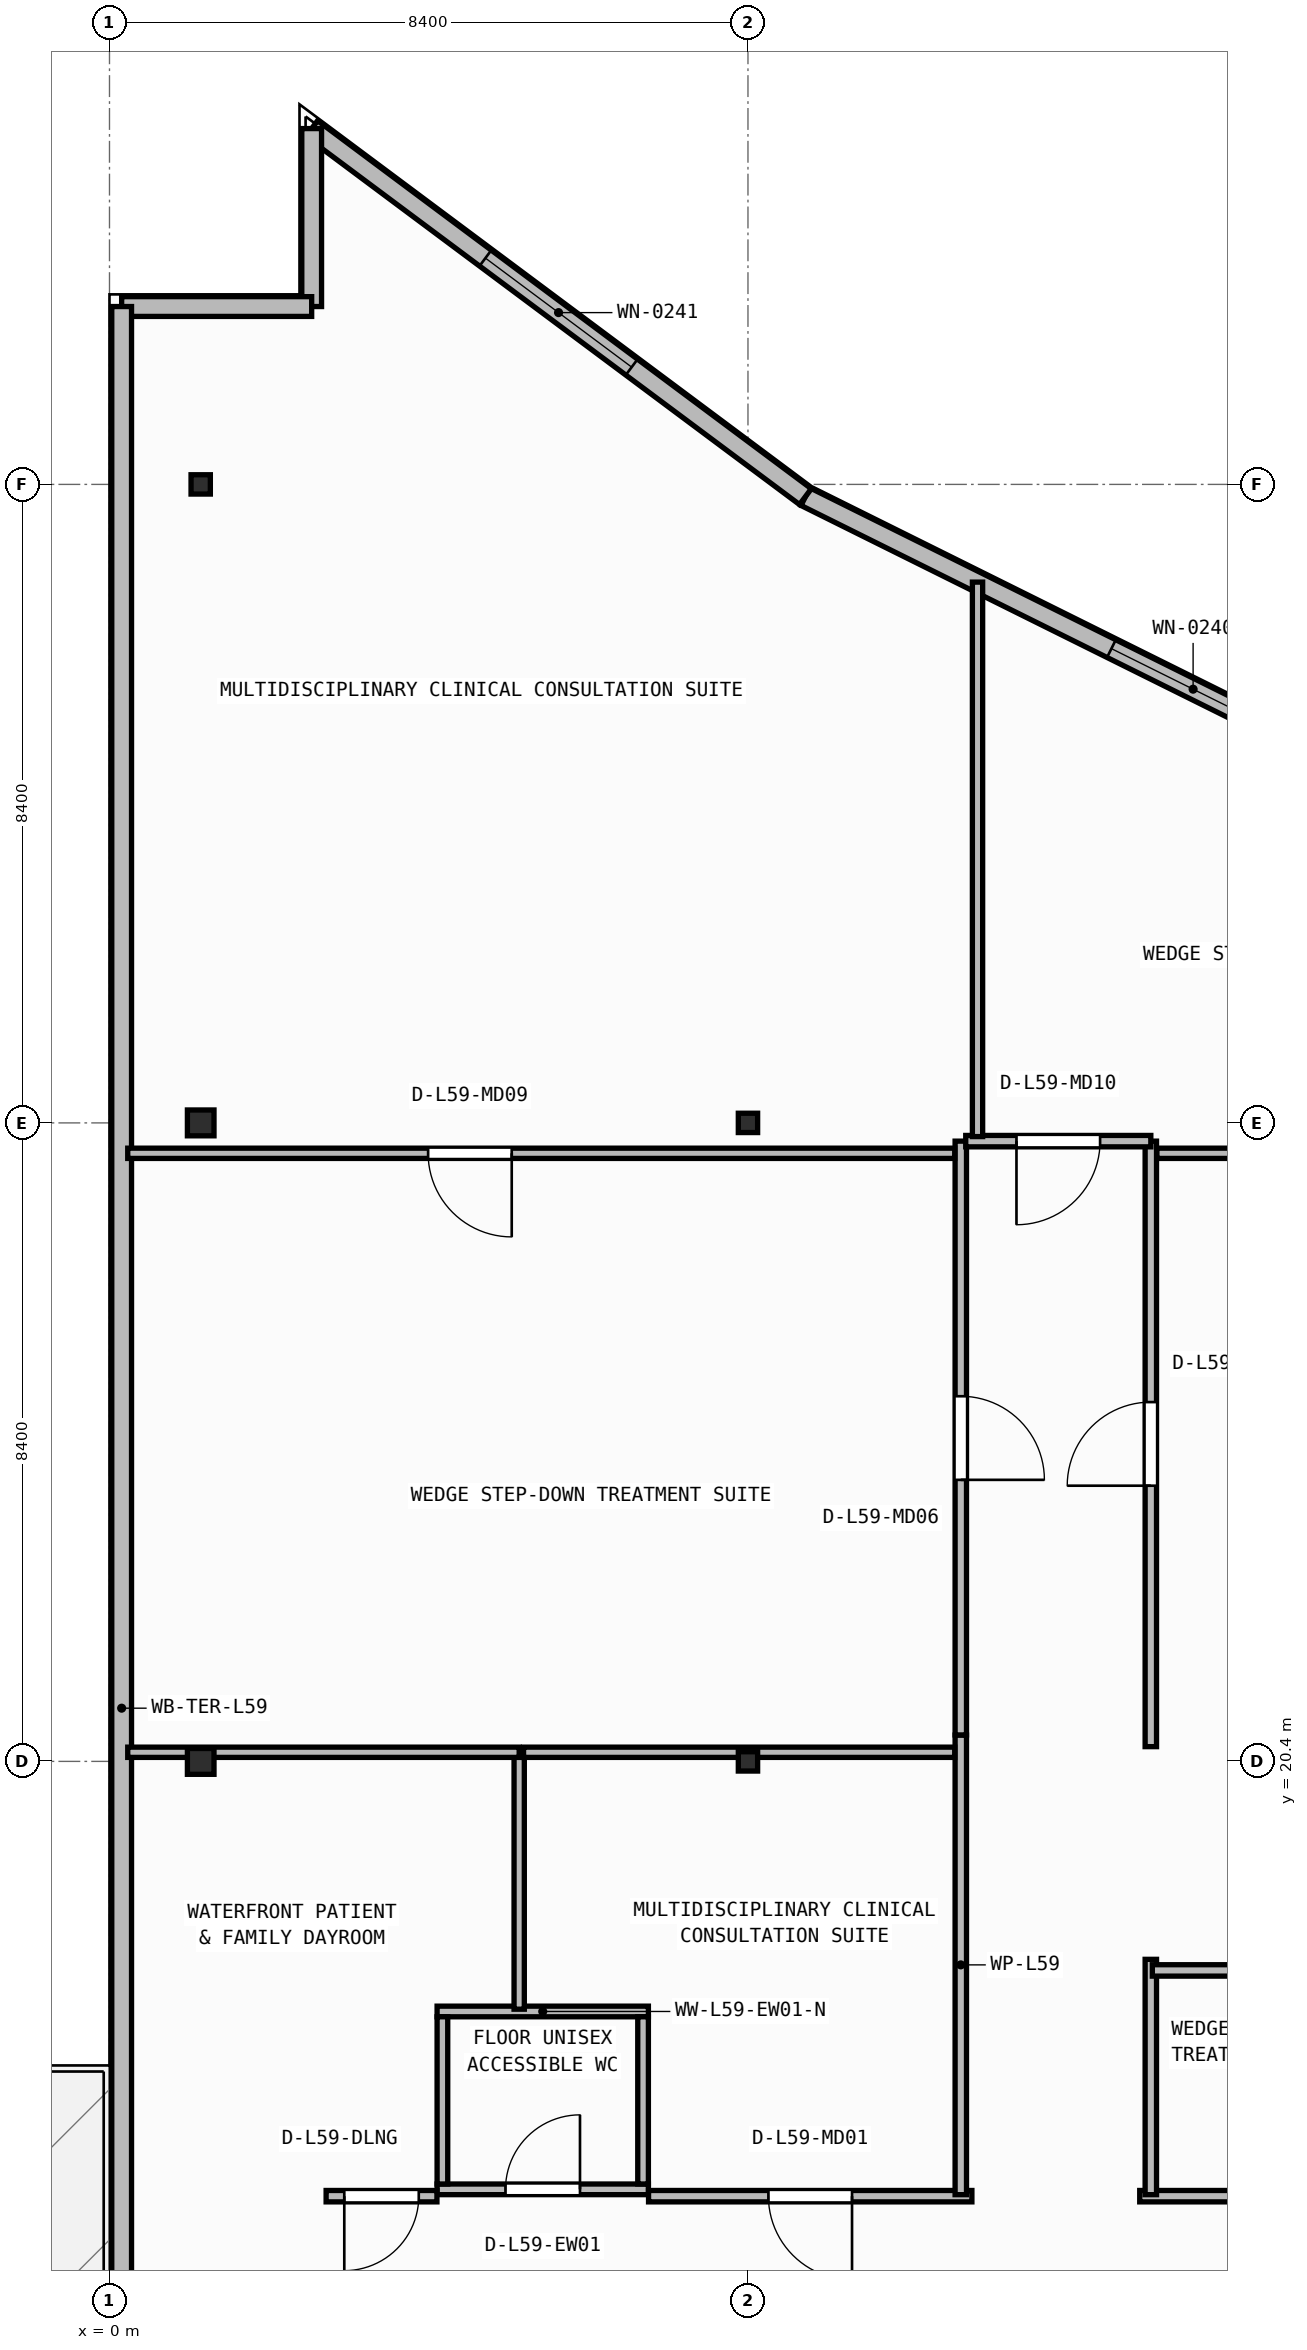
"""IFC4 building model, lengths in metres.
Left out: names, types, materials, properties, quantities, classifications, styles, units other than length and angle.
Written with IfcOpenShell. Run it as: python <this file> out.ifc"""

import sys

from ifc_helpers import new_model, si_unit, direction, frame, frame_2d, origin, origin_2d, place, context, subcontext, project, spatial, rectangle, i_section, extrude, element, fill, save


model = new_model("IFC4")
c1 = context("Model", 3, precision=1e-05, world=origin(), true_north=direction((0.0, 1.0)))
c2 = subcontext(c1, "Body", "Model", "MODEL_VIEW")
j1 = project(units=[si_unit("LENGTHUNIT", "METRE"), si_unit("PLANEANGLEUNIT", "RADIAN")], contexts=[c1])
p1 = place(None, origin())
s1 = spatial("IfcSite", under=j1, at=p1, CompositionType="ELEMENT")
p2 = place(p1, origin())
s2 = spatial("IfcBuilding", under=s1, at=p2, CompositionType="ELEMENT")
p3 = place(p2, frame((0.0, 0.0, 240.75)))
s3 = spatial("IfcBuildingStorey", under=s2, at=p3, CompositionType="ELEMENT", Elevation=240.75)
p4 = place(p3, frame((1.2, 20.4, 0.0), z_axis=(0.0, 0.0, 1.0), x_axis=(1.0, 0.0, 0.0)))
e1 = element("IfcColumn", 1, at=p4, inside=s3, PredefinedType="COLUMN", context=c2, shape_type="SweptSolid", body=[
    extrude(i_section(OverallWidth=0.35, OverallDepth=0.34, WebThickness=0.016, FlangeThickness=0.028, at=origin_2d()), origin(), (0.0, 0.0, 1.0), 3.95),
])
p5 = place(p3, frame((8.4, 20.4, 0.0), z_axis=(0.0, 0.0, 1.0), x_axis=(1.0, 0.0, 0.0)))
e2 = element("IfcColumn", 2, at=p5, inside=s3, PredefinedType="COLUMN", context=c2, shape_type="SweptSolid", body=[
    extrude(i_section(OverallWidth=0.254, OverallDepth=0.254, WebThickness=0.009, FlangeThickness=0.014, FilletRadius=0.013, at=origin_2d()), origin(), (0.0, 0.0, 1.0), 3.95),
])
p6 = place(p3, frame((1.2, 28.8, 0.0), z_axis=(0.0, 0.0, 1.0), x_axis=(1.0, 0.0, 0.0)))
e3 = element("IfcColumn", 3, at=p6, inside=s3, PredefinedType="COLUMN", context=c2, shape_type="SweptSolid", body=[
    extrude(i_section(OverallWidth=0.35, OverallDepth=0.34, WebThickness=0.016, FlangeThickness=0.028, at=origin_2d()), origin(), (0.0, 0.0, 1.0), 3.95),
])
for number, where, z_axis, x_axis in (
    (4, (8.4, 28.8, 0.0), (0.0, 0.0, 1.0), (1.0, 0.0, 0.0)),
    (5, (1.2, 37.2, 0.0), (0.0, 0.0, 1.0), (1.0, 0.0, 0.0)),
):
    element("IfcColumn", number, at=place(p3, frame(where, z_axis=z_axis, x_axis=x_axis)), inside=s3, PredefinedType="COLUMN", context=c2, shape_type="SweptSolid", body=[
        extrude(i_section(OverallWidth=0.254, OverallDepth=0.254, WebThickness=0.009, FlangeThickness=0.014, FilletRadius=0.013, at=origin_2d()), origin(), (0.0, 0.0, 1.0), 3.95),
    ])
p7 = place(p3, frame((19.357, 31.973, 0.0), z_axis=(0.0, 0.0, 1.0), x_axis=(-0.895624365378, 0.444811191565, 0.0)))
e6 = element("IfcWall", 6, at=p7, inside=s3, PredefinedType="STANDARD", context=c2, shape_type="SweptSolid", body=[
    extrude(rectangle(XDim=11.389, YDim=0.26, at=frame_2d((5.695, 0.0))), origin(), (0.0, 0.0, 1.0), 3.71),
])
p8 = place(p7, frame((4.495, 0.0, 0.9)))
e7 = element("IfcOpeningElement", 7, at=p8, cuts=e6, PredefinedType="OPENING", context=c2, shape_type="SweptSolid", body=[
    extrude(rectangle(XDim=2.4, YDim=1.65, at=frame_2d((1.2, 0.825))), frame((0.0, 0.14, 0.0), z_axis=(0.0, -1.0, 0.0), x_axis=(1.0, 0.0, 0.0)), (0.0, 0.0, 1.0), 0.28),
])
p9 = place(p3, frame((9.156, 37.039, 0.0), z_axis=(0.0, 0.0, 1.0), x_axis=(-0.801775528243, 0.597625302602, 0.0)))
e8 = element("IfcWall", 8, at=p9, inside=s3, PredefinedType="STANDARD", context=c2, shape_type="SweptSolid", body=[
    extrude(rectangle(XDim=8.102, YDim=0.26, at=frame_2d((4.051, 0.0))), origin(), (0.0, 0.0, 1.0), 3.71),
])
p10 = place(p9, frame((2.851, 0.0, 0.9)))
e9 = element("IfcOpeningElement", 9, at=p10, cuts=e8, PredefinedType="OPENING", context=c2, shape_type="SweptSolid", body=[
    extrude(rectangle(XDim=2.4, YDim=1.65, at=frame_2d((1.2, 0.825))), frame((0.0, 0.14, 0.0), z_axis=(0.0, -1.0, 0.0), x_axis=(1.0, 0.0, 0.0)), (0.0, 0.0, 1.0), 0.28),
])
p11 = place(p3, frame((2.66, 41.881, 0.0), z_axis=(0.0, 0.0, 1.0), x_axis=(0.0, -1.0, 0.0)))
e10 = element("IfcWall", 10, at=p11, inside=s3, PredefinedType="STANDARD", context=c2, shape_type="SweptSolid", body=[
    extrude(rectangle(XDim=2.341, YDim=0.26, at=frame_2d((1.17, 0.0))), origin(), (0.0, 0.0, 1.0), 3.71),
])
p12 = place(p3, frame((2.66, 39.54, 0.0), z_axis=(0.0, 0.0, 1.0), x_axis=(-1.0, 0.0, 0.0)))
e11 = element("IfcWall", 11, at=p12, inside=s3, PredefinedType="STANDARD", context=c2, shape_type="SweptSolid", body=[
    extrude(rectangle(XDim=2.5, YDim=0.26, at=frame_2d((1.25, 0.0))), origin(), (0.0, 0.0, 1.0), 3.71),
])
p13 = place(p3, frame((0.16, 39.54, 0.0), z_axis=(0.0, 0.0, 1.0), x_axis=(0.0, -1.0, 0.0)))
e12 = element("IfcWall", 12, at=p13, inside=s3, PredefinedType="STANDARD", context=c2, shape_type="SweptSolid", body=[
    extrude(rectangle(XDim=36.88, YDim=0.26, at=frame_2d((18.44, 0.0))), origin(), (0.0, 0.0, 1.0), 3.71),
])
p14 = place(p13, frame((29.059, 0.0, 0.0)))
e13 = element("IfcOpeningElement", 13, at=p14, cuts=e12, PredefinedType="OPENING", context=c2, shape_type="SweptSolid", body=[
    extrude(rectangle(XDim=1.3, YDim=2.15, at=frame_2d((0.65, 1.075))), frame((0.0, 0.14, 0.0), z_axis=(0.0, -1.0, 0.0), x_axis=(1.0, 0.0, 0.0)), (0.0, 0.0, 1.0), 0.28),
])
p15 = place(p3, frame((4.31, 14.77, 0.0), z_axis=(0.0, 0.0, 1.0), x_axis=(1.0, 0.0, 0.0)))
e14 = element("IfcWall", 14, at=p15, inside=s3, PredefinedType="PARTITIONING", context=c2, shape_type="SweptSolid", body=[
    extrude(rectangle(XDim=2.78, YDim=0.14, at=frame_2d((1.39, 0.0))), origin(), (0.0, 0.0, 1.0), 3.71),
])
p16 = place(p15, frame((0.9, 0.0, 0.0)))
e15 = element("IfcOpeningElement", 15, at=p16, cuts=e14, PredefinedType="OPENING", context=c2, shape_type="SweptSolid", body=[
    extrude(rectangle(XDim=0.98, YDim=2.1, at=frame_2d((0.49, 1.05))), frame((0.0, 0.08, 0.0), z_axis=(0.0, -1.0, 0.0), x_axis=(1.0, 0.0, 0.0)), (0.0, 0.0, 1.0), 0.16),
])
p17 = place(p3, frame((4.31, 17.11, 0.0), z_axis=(0.0, 0.0, 1.0), x_axis=(1.0, 0.0, 0.0)))
e16 = element("IfcWall", 16, at=p17, inside=s3, PredefinedType="PARTITIONING", context=c2, shape_type="SweptSolid", body=[
    extrude(rectangle(XDim=2.78, YDim=0.14, at=frame_2d((1.39, 0.0))), origin(), (0.0, 0.0, 1.0), 3.71),
])
for number, where, z_axis, x_axis in (
    (17, (4.38, 14.84, 0.0), (0.0, 0.0, 1.0), (0.0, 1.0, 0.0)),
    (18, (7.02, 14.84, 0.0), (0.0, 0.0, 1.0), (0.0, 1.0, 0.0)),
):
    element("IfcWall", number, at=place(p3, frame(where, z_axis=z_axis, x_axis=x_axis)), inside=s3, PredefinedType="PARTITIONING", context=c2, shape_type="SweptSolid", body=[
        extrude(rectangle(XDim=2.2, YDim=0.14, at=frame_2d((1.1, 0.0))), origin(), (0.0, 0.0, 1.0), 3.71),
    ])
p18 = place(p3, frame((4.308, 14.68, 0.0), z_axis=(0.0, 0.0, 1.0), x_axis=(-1.0, 0.0, 0.0)))
e19 = element("IfcWall", 19, at=p18, inside=s3, PredefinedType="PARTITIONING", context=c2, shape_type="SweptSolid", body=[
    extrude(rectangle(XDim=1.458, YDim=0.15, at=frame_2d((0.729, 0.0))), origin(), (0.0, 0.0, 1.0), 3.71),
])
p19 = place(p18, frame((0.239, 0.0, 0.0)))
e20 = element("IfcOpeningElement", 20, at=p19, cuts=e19, PredefinedType="OPENING", context=c2, shape_type="SweptSolid", body=[
    extrude(rectangle(XDim=0.98, YDim=2.1, at=frame_2d((0.49, 1.05))), frame((0.0, 0.085, 0.0), z_axis=(0.0, -1.0, 0.0), x_axis=(1.0, 0.0, 0.0)), (0.0, 0.0, 1.0), 0.17),
])
p20 = place(p3, frame((11.346, 14.68, 0.0), z_axis=(0.0, 0.0, 1.0), x_axis=(-1.0, 0.0, 0.0)))
e21 = element("IfcWall", 21, at=p20, inside=s3, PredefinedType="PARTITIONING", context=c2, shape_type="SweptSolid", body=[
    extrude(rectangle(XDim=4.254, YDim=0.15, at=frame_2d((2.127, 0.0))), origin(), (0.0, 0.0, 1.0), 3.71),
])
p21 = place(p20, frame((1.577, 0.0, 0.0)))
e22 = element("IfcOpeningElement", 22, at=p21, cuts=e21, PredefinedType="OPENING", context=c2, shape_type="SweptSolid", body=[
    extrude(rectangle(XDim=1.1, YDim=2.1, at=frame_2d((0.55, 1.05))), frame((0.0, 0.085, 0.0), z_axis=(0.0, -1.0, 0.0), x_axis=(1.0, 0.0, 0.0)), (0.0, 0.0, 1.0), 0.17),
])
p22 = place(p3, frame((19.196, 14.68, 0.0), z_axis=(0.0, 0.0, 1.0), x_axis=(-1.0, 0.0, 0.0)))
e23 = element("IfcWall", 23, at=p22, inside=s3, PredefinedType="PARTITIONING", context=c2, shape_type="SweptSolid", body=[
    extrude(rectangle(XDim=5.642, YDim=0.15, at=frame_2d((2.821, 0.0))), origin(), (0.0, 0.0, 1.0), 3.71),
])
p23 = place(p22, frame((2.271, 0.0, 0.0)))
e24 = element("IfcOpeningElement", 24, at=p23, cuts=e23, PredefinedType="OPENING", context=c2, shape_type="SweptSolid", body=[
    extrude(rectangle(XDim=1.1, YDim=2.1, at=frame_2d((0.55, 1.05))), frame((0.0, 0.085, 0.0), z_axis=(0.0, -1.0, 0.0), x_axis=(1.0, 0.0, 0.0)), (0.0, 0.0, 1.0), 0.17),
])
p24 = place(p3, frame((11.2, 20.746, 0.0), z_axis=(0.0, 0.0, 1.0), x_axis=(0.0, -1.0, 0.0)))
e25 = element("IfcWall", 25, at=p24, inside=s3, PredefinedType="PARTITIONING", context=c2, shape_type="SweptSolid", body=[
    extrude(rectangle(XDim=6.046, YDim=0.15, at=frame_2d((3.023, 0.0))), origin(), (0.0, 0.0, 1.0), 3.71),
])
p25 = place(p3, frame((13.7, 14.7, 0.0), z_axis=(0.0, 0.0, 1.0), x_axis=(0.0, 1.0, 0.0)))
e26 = element("IfcWall", 26, at=p25, inside=s3, PredefinedType="PARTITIONING", context=c2, shape_type="SweptSolid", body=[
    extrude(rectangle(XDim=3.096, YDim=0.15, at=frame_2d((1.548, 0.0))), origin(), (0.0, 0.0, 1.0), 3.71),
])
p26 = place(p3, frame((11.2, 28.56, 0.0), z_axis=(0.0, 0.0, 1.0), x_axis=(0.0, -1.0, 0.0)))
e27 = element("IfcWall", 27, at=p26, inside=s3, PredefinedType="PARTITIONING", context=c2, shape_type="SweptSolid", body=[
    extrude(rectangle(XDim=7.812, YDim=0.15, at=frame_2d((3.906, 0.0))), origin(), (0.0, 0.0, 1.0), 3.71),
])
p27 = place(p26, frame((3.356, 0.0, 0.0)))
e28 = element("IfcOpeningElement", 28, at=p27, cuts=e27, PredefinedType="OPENING", context=c2, shape_type="SweptSolid", body=[
    extrude(rectangle(XDim=1.1, YDim=2.1, at=frame_2d((0.55, 1.05))), frame((0.0, 0.085, 0.0), z_axis=(0.0, -1.0, 0.0), x_axis=(1.0, 0.0, 0.0)), (0.0, 0.0, 1.0), 0.17),
])
p28 = place(p3, frame((13.7, 20.594, 0.0), z_axis=(0.0, 0.0, 1.0), x_axis=(0.0, 1.0, 0.0)))
e29 = element("IfcWall", 29, at=p28, inside=s3, PredefinedType="PARTITIONING", context=c2, shape_type="SweptSolid", body=[
    extrude(rectangle(XDim=7.966, YDim=0.15, at=frame_2d((3.983, 0.0))), origin(), (0.0, 0.0, 1.0), 3.71),
])
p29 = place(p28, frame((3.433, 0.0, 0.0)))
e30 = element("IfcOpeningElement", 30, at=p29, cuts=e29, PredefinedType="OPENING", context=c2, shape_type="SweptSolid", body=[
    extrude(rectangle(XDim=1.1, YDim=2.1, at=frame_2d((0.55, 1.05))), frame((0.0, 0.085, 0.0), z_axis=(0.0, -1.0, 0.0), x_axis=(1.0, 0.0, 0.0)), (0.0, 0.0, 1.0), 0.17),
])
p30 = place(p3, frame((13.7, 28.56, 0.0), z_axis=(0.0, 0.0, 1.0), x_axis=(-1.0, 0.0, 0.0)))
e31 = element("IfcWall", 31, at=p30, inside=s3, PredefinedType="PARTITIONING", context=c2, shape_type="SweptSolid", body=[
    extrude(rectangle(XDim=2.435, YDim=0.15, at=frame_2d((1.218, 0.0))), origin(), (0.0, 0.0, 1.0), 3.157),
])
p31 = place(p30, frame((0.667, 0.0, 0.0)))
e32 = element("IfcOpeningElement", 32, at=p31, cuts=e31, PredefinedType="OPENING", context=c2, shape_type="SweptSolid", body=[
    extrude(rectangle(XDim=1.1, YDim=2.1, at=frame_2d((0.55, 1.05))), frame((0.0, 0.085, 0.0), z_axis=(0.0, -1.0, 0.0), x_axis=(1.0, 0.0, 0.0)), (0.0, 0.0, 1.0), 0.17),
])
p32 = place(p3, frame((13.72, 17.65, 0.0), z_axis=(0.0, 0.0, 1.0), x_axis=(1.0, 0.0, 0.0)))
e33 = element("IfcWall", 33, at=p32, inside=s3, PredefinedType="PARTITIONING", context=c2, shape_type="SweptSolid", body=[
    extrude(rectangle(XDim=5.476, YDim=0.15, at=frame_2d((2.738, 0.0))), origin(), (0.0, 0.0, 1.0), 3.71),
])
p33 = place(p3, frame((5.39, 17.14, 0.0), z_axis=(0.0, 0.0, 1.0), x_axis=(0.0, 1.0, 0.0)))
e34 = element("IfcWall", 34, at=p33, inside=s3, PredefinedType="PARTITIONING", context=c2, shape_type="SweptSolid", body=[
    extrude(rectangle(XDim=3.38, YDim=0.135, at=frame_2d((1.69, 0.0))), origin(), (0.0, 0.0, 1.0), 3.71),
])
p34 = place(p3, frame((5.39, 20.52, 0.0), z_axis=(0.0, 0.0, 1.0), x_axis=(-1.0, 0.0, 0.0)))
e35 = element("IfcWall", 35, at=p34, inside=s3, PredefinedType="PARTITIONING", context=c2, shape_type="SweptSolid", body=[
    extrude(rectangle(XDim=5.15, YDim=0.135, at=frame_2d((2.575, 0.0))), origin(), (0.0, 0.0, 1.0), 3.157),
])
p35 = place(p3, frame((11.12, 20.52, 0.0), z_axis=(0.0, 0.0, 1.0), x_axis=(-1.0, 0.0, 0.0)))
e36 = element("IfcWall", 36, at=p35, inside=s3, PredefinedType="PARTITIONING", context=c2, shape_type="SweptSolid", body=[
    extrude(rectangle(XDim=5.673, YDim=0.135, at=frame_2d((2.836, 0.0))), origin(), (0.0, 0.0, 1.0), 3.157),
])
p36 = place(p3, frame((11.12, 28.4, 0.0), z_axis=(0.0, 0.0, 1.0), x_axis=(-1.0, 0.0, 0.0)))
e37 = element("IfcWall", 37, at=p36, inside=s3, PredefinedType="PARTITIONING", context=c2, shape_type="SweptSolid", body=[
    extrude(rectangle(XDim=10.88, YDim=0.135, at=frame_2d((5.44, 0.0))), origin(), (0.0, 0.0, 1.0), 3.157),
])
p37 = place(p36, frame((5.828, 0.0, 0.0)))
e38 = element("IfcOpeningElement", 38, at=p37, cuts=e37, PredefinedType="OPENING", context=c2, shape_type="SweptSolid", body=[
    extrude(rectangle(XDim=1.1, YDim=2.1, at=frame_2d((0.55, 1.05))), frame((0.0, 0.077, 0.0), z_axis=(0.0, -1.0, 0.0), x_axis=(1.0, 0.0, 0.0)), (0.0, 0.0, 1.0), 0.155),
])
p38 = place(p3, frame((26.138, 28.4, 0.0), z_axis=(0.0, 0.0, 1.0), x_axis=(-1.0, 0.0, 0.0)))
e39 = element("IfcWall", 39, at=p38, inside=s3, PredefinedType="PARTITIONING", context=c2, shape_type="SweptSolid", body=[
    extrude(rectangle(XDim=12.358, YDim=0.135, at=frame_2d((6.179, 0.0))), origin(), (0.0, 0.0, 1.0), 3.157),
])
p39 = place(p3, frame((11.42, 28.62, 0.0), z_axis=(0.0, 0.0, 1.0), x_axis=(0.0, 1.0, 0.0)))
e40 = element("IfcWall", 40, at=p39, inside=s3, PredefinedType="PARTITIONING", context=c2, shape_type="SweptSolid", body=[
    extrude(rectangle(XDim=7.294, YDim=0.135, at=frame_2d((3.647, 0.0))), origin(), (0.0, 0.0, 1.0), 3.71),
])
p40 = place(p8, origin())
e41 = element("IfcWindow", 41, at=p40, inside=s3, PartitioningType="SINGLE_PANEL", PredefinedType="WINDOW", context=c2, shape_type="SweptSolid", body=[
    extrude(rectangle(XDim=2.4, YDim=1.65, at=frame_2d((1.2, 0.825))), frame((0.0, 0.03, 0.0), z_axis=(0.0, -1.0, 0.0), x_axis=(1.0, 0.0, 0.0)), (0.0, 0.0, 1.0), 0.06),
])
fill(e7, e41)
p41 = place(p10, origin())
e42 = element("IfcWindow", 42, at=p41, inside=s3, PartitioningType="SINGLE_PANEL", PredefinedType="WINDOW", context=c2, shape_type="SweptSolid", body=[
    extrude(rectangle(XDim=2.4, YDim=1.65, at=frame_2d((1.2, 0.825))), frame((0.0, 0.03, 0.0), z_axis=(0.0, -1.0, 0.0), x_axis=(1.0, 0.0, 0.0)), (0.0, 0.0, 1.0), 0.06),
])
fill(e9, e42)
p42 = place(p16, origin())
e43 = element("IfcDoor", 43, at=p42, inside=s3, OperationType="SINGLE_SWING_RIGHT", PredefinedType="DOOR", context=c2, shape_type="SweptSolid", body=[
    extrude(rectangle(XDim=0.98, YDim=2.1, at=frame_2d((0.49, 1.05))), frame((0.0, 0.025, 0.0), z_axis=(0.0, -1.0, 0.0), x_axis=(1.0, 0.0, 0.0)), (0.0, 0.0, 1.0), 0.05),
])
fill(e15, e43)
p43 = place(p19, origin())
e44 = element("IfcDoor", 44, at=p43, inside=s3, OperationType="SINGLE_SWING_RIGHT", PredefinedType="DOOR", context=c2, shape_type="SweptSolid", body=[
    extrude(rectangle(XDim=0.98, YDim=2.1, at=frame_2d((0.49, 1.05))), frame((0.0, 0.025, 0.0), z_axis=(0.0, -1.0, 0.0), x_axis=(1.0, 0.0, 0.0)), (0.0, 0.0, 1.0), 0.05),
])
fill(e20, e44)
p44 = place(p21, origin())
e45 = element("IfcDoor", 45, at=p44, inside=s3, OperationType="SINGLE_SWING_LEFT", PredefinedType="DOOR", context=c2, shape_type="SweptSolid", body=[
    extrude(rectangle(XDim=1.1, YDim=2.1, at=frame_2d((0.55, 1.05))), frame((0.0, 0.025, 0.0), z_axis=(0.0, -1.0, 0.0), x_axis=(1.0, 0.0, 0.0)), (0.0, 0.0, 1.0), 0.05),
])
fill(e22, e45)
p45 = place(p27, origin())
e46 = element("IfcDoor", 46, at=p45, inside=s3, OperationType="SINGLE_SWING_RIGHT", PredefinedType="DOOR", context=c2, shape_type="SweptSolid", body=[
    extrude(rectangle(XDim=1.1, YDim=2.1, at=frame_2d((0.55, 1.05))), frame((0.0, 0.025, 0.0), z_axis=(0.0, -1.0, 0.0), x_axis=(1.0, 0.0, 0.0)), (0.0, 0.0, 1.0), 0.05),
])
fill(e28, e46)
p46 = place(p29, origin())
e47 = element("IfcDoor", 47, at=p46, inside=s3, OperationType="SINGLE_SWING_LEFT", PredefinedType="DOOR", context=c2, shape_type="SweptSolid", body=[
    extrude(rectangle(XDim=1.1, YDim=2.1, at=frame_2d((0.55, 1.05))), frame((0.0, 0.025, 0.0), z_axis=(0.0, -1.0, 0.0), x_axis=(1.0, 0.0, 0.0)), (0.0, 0.0, 1.0), 0.05),
])
fill(e30, e47)
p47 = place(p31, origin())
e48 = element("IfcDoor", 48, at=p47, inside=s3, OperationType="SINGLE_SWING_RIGHT", PredefinedType="DOOR", context=c2, shape_type="SweptSolid", body=[
    extrude(rectangle(XDim=1.1, YDim=2.1, at=frame_2d((0.55, 1.05))), frame((0.0, 0.025, 0.0), z_axis=(0.0, -1.0, 0.0), x_axis=(1.0, 0.0, 0.0)), (0.0, 0.0, 1.0), 0.05),
])
fill(e32, e48)
p48 = place(p37, origin())
e49 = element("IfcDoor", 49, at=p48, inside=s3, OperationType="SINGLE_SWING_LEFT", PredefinedType="DOOR", context=c2, shape_type="SweptSolid", body=[
    extrude(rectangle(XDim=1.1, YDim=2.1, at=frame_2d((0.55, 1.05))), frame((0.0, 0.025, 0.0), z_axis=(0.0, -1.0, 0.0), x_axis=(1.0, 0.0, 0.0)), (0.0, 0.0, 1.0), 0.05),
])
fill(e38, e49)
save(model, sys.argv[1])
